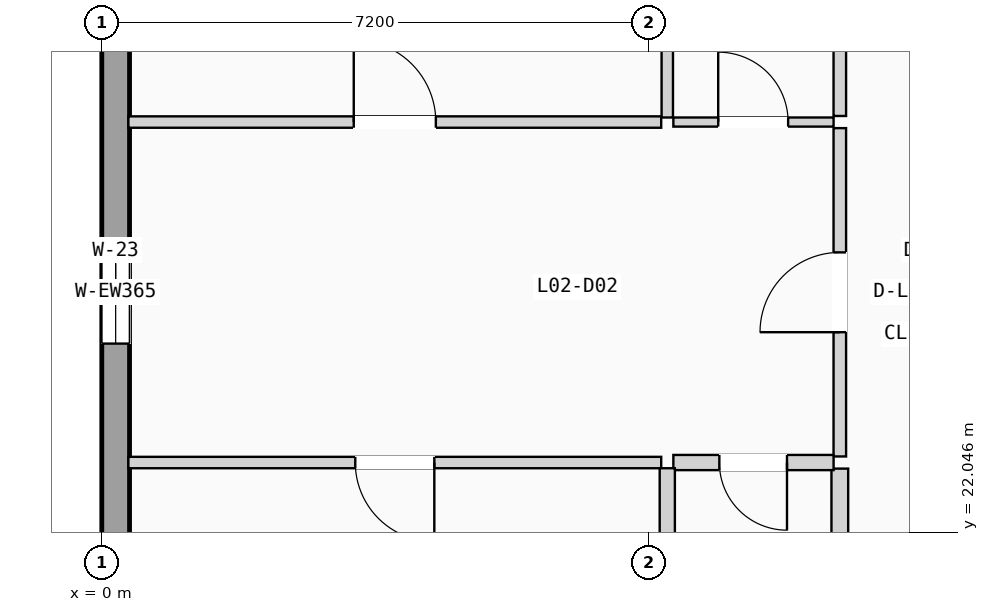
"""IFC4 building model, lengths in metres.
Left out: names, types, materials, properties, quantities, classifications, styles, units other than length and angle.
Written with IfcOpenShell. Run it as: python <this file> out.ifc"""

import sys

from ifc_helpers import new_model, si_unit, direction, frame, frame_2d, origin, place, context, subcontext, project, spatial, rectangle, extrude, element, fill, save


model = new_model("IFC4")
c1 = context("Model", 3, precision=1e-05, world=origin(), true_north=direction((0.0, 1.0)))
c2 = subcontext(c1, "Body", "Model", "MODEL_VIEW")
j1 = project(units=[si_unit("LENGTHUNIT", "METRE"), si_unit("PLANEANGLEUNIT", "RADIAN")], contexts=[c1])
p1 = place(None, origin())
s1 = spatial("IfcSite", under=j1, at=p1, CompositionType="ELEMENT")
p2 = place(p1, origin())
s2 = spatial("IfcBuilding", under=s1, at=p2, CompositionType="ELEMENT")
p3 = place(p2, frame((0.0, 0.0, 8.575)))
s3 = spatial("IfcBuildingStorey", under=s2, at=p3, CompositionType="ELEMENT", Elevation=8.575)
p4 = place(p3, frame((0.183, 0.365, 0.0), z_axis=(0.0, 0.0, 1.0), x_axis=(0.0, 1.0, 0.0)))
e1 = element("IfcWall", 1, at=p4, inside=s3, PredefinedType="SOLIDWALL", context=c2, shape_type="SweptSolid", body=[
    extrude(rectangle(XDim=49.67, YDim=0.365, at=frame_2d((24.835, 0.0))), origin(), (0.0, 0.0, 1.0), 3.24),
])
p5 = place(p4, frame((11.701, 0.0, 0.755)))
e2 = element("IfcOpeningElement", 2, at=p5, cuts=e1, PredefinedType="OPENING", context=c2, shape_type="SweptSolid", body=[
    extrude(rectangle(XDim=1.25, YDim=1.8, at=frame_2d((0.625, 0.9))), frame((0.0, 0.192, 0.0), z_axis=(0.0, -1.0, 0.0), x_axis=(1.0, 0.0, 0.0)), (0.0, 0.0, 1.0), 0.385),
])
p6 = place(p4, frame((8.306, 0.0, 0.9)))
e3 = element("IfcOpeningElement", 3, at=p6, cuts=e1, PredefinedType="OPENING", context=c2, shape_type="SweptSolid", body=[
    extrude(rectangle(XDim=1.35, YDim=1.2, at=frame_2d((0.675, 0.6))), frame((0.0, 0.192, 0.0), z_axis=(0.0, -1.0, 0.0), x_axis=(1.0, 0.0, 0.0)), (0.0, 0.0, 1.0), 0.385),
])
p7 = place(p4, frame((16.34, 0.0, 0.9)))
e4 = element("IfcOpeningElement", 4, at=p7, cuts=e1, PredefinedType="OPENING", context=c2, shape_type="SweptSolid", body=[
    extrude(rectangle(XDim=1.35, YDim=1.35, at=frame_2d((0.675, 0.675))), frame((0.0, 0.192, 0.0), z_axis=(0.0, -1.0, 0.0), x_axis=(1.0, 0.0, 0.0)), (0.0, 0.0, 1.0), 0.385),
])
p8 = place(p4, frame((24.16, 0.0, 0.9)))
e5 = element("IfcOpeningElement", 5, at=p8, cuts=e1, PredefinedType="OPENING", context=c2, shape_type="SweptSolid", body=[
    extrude(rectangle(XDim=1.35, YDim=1.5, at=frame_2d((0.675, 0.75))), frame((0.0, 0.192, 0.0), z_axis=(0.0, -1.0, 0.0), x_axis=(1.0, 0.0, 0.0)), (0.0, 0.0, 1.0), 0.385),
])
p9 = place(p4, frame((19.278, 0.0, 0.9)))
e6 = element("IfcOpeningElement", 6, at=p9, cuts=e1, PredefinedType="OPENING", context=c2, shape_type="SweptSolid", body=[
    extrude(rectangle(XDim=1.35, YDim=1.65, at=frame_2d((0.675, 0.825))), frame((0.0, 0.192, 0.0), z_axis=(0.0, -1.0, 0.0), x_axis=(1.0, 0.0, 0.0)), (0.0, 0.0, 1.0), 0.385),
])
p10 = place(p4, frame((29.042, 0.0, 0.755)))
e7 = element("IfcOpeningElement", 7, at=p10, cuts=e1, PredefinedType="OPENING", context=c2, shape_type="SweptSolid", body=[
    extrude(rectangle(XDim=1.35, YDim=1.8, at=frame_2d((0.675, 0.9))), frame((0.0, 0.192, 0.0), z_axis=(0.0, -1.0, 0.0), x_axis=(1.0, 0.0, 0.0)), (0.0, 0.0, 1.0), 0.385),
])
p11 = place(p4, frame((36.603, 0.0, 0.9)))
e8 = element("IfcOpeningElement", 8, at=p11, cuts=e1, PredefinedType="OPENING", context=c2, shape_type="SweptSolid", body=[
    extrude(rectangle(XDim=1.48, YDim=1.2, at=frame_2d((0.74, 0.6))), frame((0.0, 0.192, 0.0), z_axis=(0.0, -1.0, 0.0), x_axis=(1.0, 0.0, 0.0)), (0.0, 0.0, 1.0), 0.385),
])
p12 = place(p4, frame((31.915, 0.0, 0.9)))
e9 = element("IfcOpeningElement", 9, at=p12, cuts=e1, PredefinedType="OPENING", context=c2, shape_type="SweptSolid", body=[
    extrude(rectangle(XDim=1.48, YDim=1.35, at=frame_2d((0.74, 0.675))), frame((0.0, 0.192, 0.0), z_axis=(0.0, -1.0, 0.0), x_axis=(1.0, 0.0, 0.0)), (0.0, 0.0, 1.0), 0.385),
])
p13 = place(p4, frame((39.948, 0.0, 0.9)))
e10 = element("IfcOpeningElement", 10, at=p13, cuts=e1, PredefinedType="OPENING", context=c2, shape_type="SweptSolid", body=[
    extrude(rectangle(XDim=1.48, YDim=1.5, at=frame_2d((0.74, 0.75))), frame((0.0, 0.192, 0.0), z_axis=(0.0, -1.0, 0.0), x_axis=(1.0, 0.0, 0.0)), (0.0, 0.0, 1.0), 0.385),
])
p14 = place(p3, frame((9.71, 23.04, 0.0), z_axis=(0.0, 0.0, 1.0), x_axis=(0.0, 1.0, 0.0)))
e11 = element("IfcWall", 11, at=p14, inside=s3, PredefinedType="PARTITIONING", context=c2, shape_type="SweptSolid", body=[
    extrude(rectangle(XDim=4.32, YDim=0.165, at=frame_2d((2.16, 0.0))), origin(), (0.0, 0.0, 1.0), 3.22),
])
p15 = place(p14, frame((1.635, 0.0, 0.0)))
e12 = element("IfcOpeningElement", 12, at=p15, cuts=e11, PredefinedType="OPENING", context=c2, shape_type="SweptSolid", body=[
    extrude(rectangle(XDim=1.05, YDim=2.13, at=frame_2d((0.525, 1.065))), frame((0.0, 0.093, 0.0), z_axis=(0.0, -1.0, 0.0), x_axis=(1.0, 0.0, 0.0)), (0.0, 0.0, 1.0), 0.185),
])
p16 = place(p3, frame((9.71, 19.306, 0.0), z_axis=(0.0, 0.0, 1.0), x_axis=(0.0, 1.0, 0.0)))
e13 = element("IfcWall", 13, at=p16, inside=s3, PredefinedType="PLUMBINGWALL", context=c2, shape_type="SweptSolid", body=[
    extrude(rectangle(XDim=3.574, YDim=0.22, at=frame_2d((1.787, 0.0))), origin(), (0.0, 0.0, 1.0), 3.22),
])
p17 = place(p3, frame((9.71, 27.52, 0.0), z_axis=(0.0, 0.0, 1.0), x_axis=(0.0, 1.0, 0.0)))
e14 = element("IfcWall", 14, at=p17, inside=s3, PredefinedType="PARTITIONING", context=c2, shape_type="SweptSolid", body=[
    extrude(rectangle(XDim=3.574, YDim=0.165, at=frame_2d((1.787, 0.0))), origin(), (0.0, 0.0, 1.0), 3.22),
])
p18 = place(p3, frame((7.52, 22.96, 0.0), z_axis=(0.0, 0.0, 1.0), x_axis=(1.0, 0.0, 0.0)))
e15 = element("IfcWall", 15, at=p18, inside=s3, PredefinedType="PLUMBINGWALL", context=c2, shape_type="SweptSolid", body=[
    extrude(rectangle(XDim=2.108, YDim=0.2, at=frame_2d((1.054, 0.0))), origin(), (0.0, 0.0, 1.0), 3.22),
])
p19 = place(p18, frame((0.605, 0.0, 0.0)))
e16 = element("IfcOpeningElement", 16, at=p19, cuts=e15, PredefinedType="OPENING", context=c2, shape_type="SweptSolid", body=[
    extrude(rectangle(XDim=0.89, YDim=2.03, at=frame_2d((0.445, 1.015))), frame((0.0, 0.11, 0.0), z_axis=(0.0, -1.0, 0.0), x_axis=(1.0, 0.0, 0.0)), (0.0, 0.0, 1.0), 0.22),
])
p20 = place(p3, frame((7.52, 27.44, 0.0), z_axis=(0.0, 0.0, 1.0), x_axis=(1.0, 0.0, 0.0)))
e17 = element("IfcWall", 17, at=p20, inside=s3, PredefinedType="PARTITIONING", context=c2, shape_type="SweptSolid", body=[
    extrude(rectangle(XDim=2.108, YDim=0.12, at=frame_2d((1.054, 0.0))), origin(), (0.0, 0.0, 1.0), 3.22),
])
p21 = place(p20, frame((0.59, 0.0, 0.0)))
e18 = element("IfcOpeningElement", 18, at=p21, cuts=e17, PredefinedType="OPENING", context=c2, shape_type="SweptSolid", body=[
    extrude(rectangle(XDim=0.92, YDim=2.02, at=frame_2d((0.46, 1.01))), frame((0.0, 0.07, 0.0), z_axis=(0.0, -1.0, 0.0), x_axis=(1.0, 0.0, 0.0)), (0.0, 0.0, 1.0), 0.14),
])
p22 = place(p3, frame((0.35, 22.96, 0.0), z_axis=(0.0, 0.0, 1.0), x_axis=(1.0, 0.0, 0.0)))
e19 = element("IfcWall", 19, at=p22, inside=s3, PredefinedType="PARTITIONING", context=c2, shape_type="SweptSolid", body=[
    extrude(rectangle(XDim=7.01, YDim=0.15, at=frame_2d((3.505, 0.0))), origin(), (0.0, 0.0, 1.0), 3.22),
])
p23 = place(p22, frame((2.985, 0.0, 0.0)))
e20 = element("IfcOpeningElement", 20, at=p23, cuts=e19, PredefinedType="OPENING", context=c2, shape_type="SweptSolid", body=[
    extrude(rectangle(XDim=1.04, YDim=2.08, at=frame_2d((0.52, 1.04))), frame((0.0, 0.085, 0.0), z_axis=(0.0, -1.0, 0.0), x_axis=(1.0, 0.0, 0.0)), (0.0, 0.0, 1.0), 0.17),
])
p24 = place(p3, frame((0.35, 27.44, 0.0), z_axis=(0.0, 0.0, 1.0), x_axis=(1.0, 0.0, 0.0)))
e21 = element("IfcWall", 21, at=p24, inside=s3, PredefinedType="PARTITIONING", context=c2, shape_type="SweptSolid", body=[
    extrude(rectangle(XDim=7.01, YDim=0.15, at=frame_2d((3.505, 0.0))), origin(), (0.0, 0.0, 1.0), 3.22),
])
p25 = place(p24, frame((2.965, 0.0, 0.0)))
e22 = element("IfcOpeningElement", 22, at=p25, cuts=e21, PredefinedType="OPENING", context=c2, shape_type="SweptSolid", body=[
    extrude(rectangle(XDim=1.08, YDim=2.1, at=frame_2d((0.54, 1.05))), frame((0.0, 0.085, 0.0), z_axis=(0.0, -1.0, 0.0), x_axis=(1.0, 0.0, 0.0)), (0.0, 0.0, 1.0), 0.17),
])
p26 = place(p3, frame((7.44, 19.306, 0.0), z_axis=(0.0, 0.0, 1.0), x_axis=(0.0, 1.0, 0.0)))
e23 = element("IfcWall", 23, at=p26, inside=s3, PredefinedType="PLUMBINGWALL", context=c2, shape_type="SweptSolid", body=[
    extrude(rectangle(XDim=3.579, YDim=0.2, at=frame_2d((1.79, 0.0))), origin(), (0.0, 0.0, 1.0), 3.22),
])
p27 = place(p3, frame((7.44, 27.5, 0.0), z_axis=(0.0, 0.0, 1.0), x_axis=(0.0, 1.0, 0.0)))
e24 = element("IfcWall", 24, at=p27, inside=s3, PredefinedType="PARTITIONING", context=c2, shape_type="SweptSolid", body=[
    extrude(rectangle(XDim=3.594, YDim=0.15, at=frame_2d((1.797, 0.0))), origin(), (0.0, 0.0, 1.0), 3.22),
])
p28 = place(p8, origin())
e25 = element("IfcWindow", 25, at=p28, inside=s3, PartitioningType="SINGLE_PANEL", PredefinedType="WINDOW", context=c2, shape_type="SweptSolid", body=[
    extrude(rectangle(XDim=1.35, YDim=1.5, at=frame_2d((0.675, 0.75))), frame((0.0, 0.03, 0.0), z_axis=(0.0, -1.0, 0.0), x_axis=(1.0, 0.0, 0.0)), (0.0, 0.0, 1.0), 0.06),
])
fill(e5, e25)
p29 = place(p15, origin())
e26 = element("IfcDoor", 26, at=p29, inside=s3, OperationType="SINGLE_SWING_LEFT", PredefinedType="DOOR", context=c2, shape_type="SweptSolid", body=[
    extrude(rectangle(XDim=1.05, YDim=2.13, at=frame_2d((0.525, 1.065))), frame((0.0, 0.025, 0.0), z_axis=(0.0, -1.0, 0.0), x_axis=(1.0, 0.0, 0.0)), (0.0, 0.0, 1.0), 0.05),
])
fill(e12, e26)
p30 = place(p19, frame((0.89, 0.0, 0.0), z_axis=(0.0, 0.0, 1.0), x_axis=(-1.0, 0.0, 0.0)))
e27 = element("IfcDoor", 27, at=p30, inside=s3, OperationType="SINGLE_SWING_RIGHT", PredefinedType="DOOR", context=c2, shape_type="SweptSolid", body=[
    extrude(rectangle(XDim=0.89, YDim=2.03, at=frame_2d((0.445, 1.015))), frame((0.0, 0.025, 0.0), z_axis=(0.0, -1.0, 0.0), x_axis=(1.0, 0.0, 0.0)), (0.0, 0.0, 1.0), 0.05),
])
fill(e16, e27)
p31 = place(p21, origin())
e28 = element("IfcDoor", 28, at=p31, inside=s3, OperationType="SINGLE_SWING_LEFT", PredefinedType="DOOR", context=c2, shape_type="SweptSolid", body=[
    extrude(rectangle(XDim=0.92, YDim=2.02, at=frame_2d((0.46, 1.01))), frame((0.0, 0.025, 0.0), z_axis=(0.0, -1.0, 0.0), x_axis=(1.0, 0.0, 0.0)), (0.0, 0.0, 1.0), 0.05),
])
fill(e18, e28)
p32 = place(p23, frame((1.04, 0.0, 0.0), z_axis=(0.0, 0.0, 1.0), x_axis=(-1.0, 0.0, 0.0)))
e29 = element("IfcDoor", 29, at=p32, inside=s3, OperationType="SINGLE_SWING_RIGHT", PredefinedType="DOOR", context=c2, shape_type="SweptSolid", body=[
    extrude(rectangle(XDim=1.04, YDim=2.08, at=frame_2d((0.52, 1.04))), frame((0.0, 0.025, 0.0), z_axis=(0.0, -1.0, 0.0), x_axis=(1.0, 0.0, 0.0)), (0.0, 0.0, 1.0), 0.05),
])
fill(e20, e29)
p33 = place(p25, origin())
e30 = element("IfcDoor", 30, at=p33, inside=s3, OperationType="SINGLE_SWING_LEFT", PredefinedType="DOOR", context=c2, shape_type="SweptSolid", body=[
    extrude(rectangle(XDim=1.08, YDim=2.1, at=frame_2d((0.54, 1.05))), frame((0.0, 0.025, 0.0), z_axis=(0.0, -1.0, 0.0), x_axis=(1.0, 0.0, 0.0)), (0.0, 0.0, 1.0), 0.05),
])
fill(e22, e30)
save(model, sys.argv[1])
